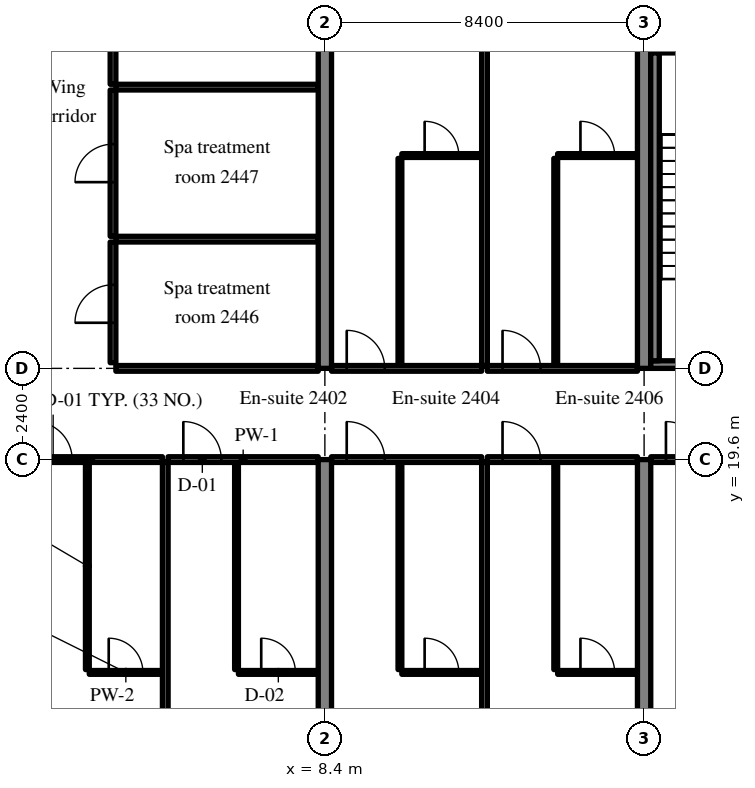
"""IFC4 building model, lengths in metres.
Left out: names, types, materials, properties, quantities, classifications, styles, units other than length and angle.
Written with IfcOpenShell. Run it as: python <this file> out.ifc"""

import sys

from ifc_helpers import new_model, si_unit, direction, frame, frame_2d, origin, place, context, subcontext, project, spatial, rectangle, extrude, source, transform, mapped, element, fill, save


model = new_model("IFC4")
c1 = context("Model", 3, precision=1e-05, world=origin(), true_north=direction((0.0, 1.0)))
c2 = subcontext(c1, "Body", "Model", "MODEL_VIEW")
j1 = project(units=[si_unit("LENGTHUNIT", "METRE"), si_unit("PLANEANGLEUNIT", "RADIAN")], contexts=[c1])
p1 = place(None, origin())
s1 = spatial("IfcSite", under=j1, at=p1, CompositionType="ELEMENT")
p2 = place(p1, origin())
s2 = spatial("IfcBuilding", under=s1, at=p2, CompositionType="ELEMENT")
p3 = place(p2, frame((0.0, 0.0, 102.8)))
s3 = spatial("IfcBuildingStorey", under=s2, at=p3, CompositionType="ELEMENT", Elevation=102.8)
m1 = source(origin(), c2, "Body", "SweptSolid", [
    extrude(rectangle(XDim=14.1, YDim=0.35, at=frame_2d((7.05, 0.0))), origin(), (0.0, 0.0, 1.0), 3.52),
])
p4 = place(p3, frame((8.4, 5.5, 0.0), z_axis=(0.0, 0.0, 1.0), x_axis=(0.0, 1.0, 0.0)))
e1 = element("IfcWall", 1, at=p4, inside=s3, PredefinedType="SHEAR", context=c2, shape_type="MappedRepresentation", body=[
    mapped(m1, transform((0.0, 0.0, 0.0), scale=1.0)),
])
m2 = source(origin(), c2, "Body", "SweptSolid", [
    extrude(rectangle(XDim=20.0, YDim=0.35, at=frame_2d((10.0, 0.0))), origin(), (0.0, 0.0, 1.0), 3.52),
])
p5 = place(p3, frame((8.4, 22.0, 0.0), z_axis=(0.0, 0.0, 1.0), x_axis=(0.0, 1.0, 0.0)))
e2 = element("IfcWall", 2, at=p5, inside=s3, PredefinedType="SHEAR", context=c2, shape_type="MappedRepresentation", body=[
    mapped(m2, transform((0.0, 0.0, 0.0), scale=1.0)),
])
p6 = place(p3, frame((16.8, 5.5, 0.0), z_axis=(0.0, 0.0, 1.0), x_axis=(0.0, 1.0, 0.0)))
e3 = element("IfcWall", 3, at=p6, inside=s3, PredefinedType="SHEAR", context=c2, shape_type="MappedRepresentation", body=[
    mapped(m1, transform((0.0, 0.0, 0.0), scale=1.0)),
])
p7 = place(p3, frame((16.8, 22.0, 0.0), z_axis=(0.0, 0.0, 1.0), x_axis=(0.0, 1.0, 0.0)))
e4 = element("IfcWall", 4, at=p7, inside=s3, PredefinedType="SHEAR", context=c2, shape_type="MappedRepresentation", body=[
    mapped(m2, transform((0.0, 0.0, 0.0), scale=1.0)),
])
m3 = source(origin(), c2, "Body", "SweptSolid", [
    extrude(rectangle(XDim=8.225, YDim=0.2, at=frame_2d((4.112, 0.0))), origin(), (0.0, 0.0, 1.0), 3.52),
])
p8 = place(p3, frame((16.975, 22.1, 0.0), z_axis=(0.0, 0.0, 1.0), x_axis=(1.0, 0.0, 0.0)))
e5 = element("IfcWall", 5, at=p8, inside=s3, PredefinedType="SOLIDWALL", context=c2, shape_type="MappedRepresentation", body=[
    mapped(m3, transform((0.0, 0.0, 0.0), scale=1.0)),
])
m4 = source(origin(), c2, "Body", "SweptSolid", [
    extrude(rectangle(XDim=1.2, YDim=2.1, at=frame_2d((0.6, 1.05))), frame((0.0, 0.11, 0.0), z_axis=(0.0, -1.0, 0.0), x_axis=(1.0, 0.0, 0.0)), (0.0, 0.0, 1.0), 0.22),
])
p9 = place(p8, frame((6.025, 0.0, 0.0)))
e6 = element("IfcOpeningElement", 6, at=p9, cuts=e5, PredefinedType="OPENING", context=c2, shape_type="MappedRepresentation", body=[
    mapped(m4, transform((0.0, 0.0, 0.0), scale=1.0)),
])
p10 = place(p3, frame((16.975, 30.4, 0.0), z_axis=(0.0, 0.0, 1.0), x_axis=(1.0, 0.0, 0.0)))
e7 = element("IfcWall", 7, at=p10, inside=s3, PredefinedType="SOLIDWALL", context=c2, shape_type="MappedRepresentation", body=[
    mapped(m3, transform((0.0, 0.0, 0.0), scale=1.0)),
])
m5 = source(origin(), c2, "Body", "SweptSolid", [
    extrude(rectangle(XDim=1.0, YDim=2.1, at=frame_2d((0.5, 1.05))), frame((0.0, 0.11, 0.0), z_axis=(0.0, -1.0, 0.0), x_axis=(1.0, 0.0, 0.0)), (0.0, 0.0, 1.0), 0.22),
])
p11 = place(p10, frame((6.125, 0.0, 0.0)))
e8 = element("IfcOpeningElement", 8, at=p11, cuts=e7, PredefinedType="OPENING", context=c2, shape_type="MappedRepresentation", body=[
    mapped(m5, transform((0.0, 0.0, 0.0), scale=1.0)),
])
m6 = source(origin(), c2, "Body", "SweptSolid", [
    extrude(rectangle(XDim=8.1, YDim=0.225, at=frame_2d((4.05, 0.0))), origin(), (0.0, 0.0, 1.0), 3.52),
])
p12 = place(p3, frame((17.087, 22.2, 0.0), z_axis=(0.0, 0.0, 1.0), x_axis=(0.0, 1.0, 0.0)))
e9 = element("IfcWall", 9, at=p12, inside=s3, PredefinedType="SOLIDWALL", context=c2, shape_type="MappedRepresentation", body=[
    mapped(m6, transform((0.0, 0.0, 0.0), scale=1.0)),
])
m7 = source(origin(), c2, "Body", "SweptSolid", [
    extrude(rectangle(XDim=5.45, YDim=0.1, at=frame_2d((2.725, 0.0))), origin(), (0.0, 0.0, 1.0), 3.52),
])
p13 = place(p3, frame((2.15, 14.075, 0.0), z_axis=(0.0, 0.0, 1.0), x_axis=(0.0, 1.0, 0.0)))
e10 = element("IfcWall", 10, at=p13, inside=s3, PredefinedType="PARTITIONING", context=c2, shape_type="MappedRepresentation", body=[
    mapped(m7, transform((0.0, 0.0, 0.0), scale=1.0)),
])
m8 = source(origin(), c2, "Body", "SweptSolid", [
    extrude(rectangle(XDim=1.925, YDim=0.1, at=frame_2d((0.962, 0.0))), origin(), (0.0, 0.0, 1.0), 3.52),
])
p14 = place(p3, frame((2.2, 14.0, 0.0), z_axis=(0.0, 0.0, 1.0), x_axis=(1.0, 0.0, 0.0)))
e11 = element("IfcWall", 11, at=p14, inside=s3, PredefinedType="PARTITIONING", context=c2, shape_type="MappedRepresentation", body=[
    mapped(m8, transform((0.0, 0.0, 0.0), scale=1.0)),
])
m9 = source(origin(), c2, "Body", "SweptSolid", [
    extrude(rectangle(XDim=0.9, YDim=2.1, at=frame_2d((0.45, 1.05))), frame((0.0, 0.06, 0.0), z_axis=(0.0, -1.0, 0.0), x_axis=(1.0, 0.0, 0.0)), (0.0, 0.0, 1.0), 0.12),
])
p15 = place(p14, frame((0.512, 0.0, 0.0)))
e12 = element("IfcOpeningElement", 12, at=p15, cuts=e11, PredefinedType="OPENING", context=c2, shape_type="MappedRepresentation", body=[
    mapped(m9, transform((0.0, 0.0, 0.0), scale=1.0)),
])
m10 = source(origin(), c2, "Body", "SweptSolid", [
    extrude(rectangle(XDim=3.775, YDim=0.15, at=frame_2d((1.887, 0.0))), origin(), (0.0, 0.0, 1.0), 2.82),
])
p16 = place(p3, frame((0.35, 19.6, 0.0), z_axis=(0.0, 0.0, 1.0), x_axis=(1.0, 0.0, 0.0)))
e13 = element("IfcWall", 13, at=p16, inside=s3, PredefinedType="PARTITIONING", context=c2, shape_type="MappedRepresentation", body=[
    mapped(m10, transform((0.0, 0.0, 0.0), scale=1.0)),
])
m11 = source(origin(), c2, "Body", "SweptSolid", [
    extrude(rectangle(XDim=1.0, YDim=2.1, at=frame_2d((0.5, 1.05))), frame((0.0, 0.085, 0.0), z_axis=(0.0, -1.0, 0.0), x_axis=(1.0, 0.0, 0.0)), (0.0, 0.0, 1.0), 0.17),
])
p17 = place(p16, frame((0.4, 0.0, 0.0)))
e14 = element("IfcOpeningElement", 14, at=p17, cuts=e13, PredefinedType="OPENING", context=c2, shape_type="MappedRepresentation", body=[
    mapped(m11, transform((0.0, 0.0, 0.0), scale=1.0)),
])
p18 = place(p3, frame((6.075, 14.075, 0.0), z_axis=(0.0, 0.0, 1.0), x_axis=(0.0, 1.0, 0.0)))
e15 = element("IfcWall", 15, at=p18, inside=s3, PredefinedType="PARTITIONING", context=c2, shape_type="MappedRepresentation", body=[
    mapped(m7, transform((0.0, 0.0, 0.0), scale=1.0)),
])
m12 = source(origin(), c2, "Body", "SweptSolid", [
    extrude(rectangle(XDim=2.1, YDim=0.1, at=frame_2d((1.05, 0.0))), origin(), (0.0, 0.0, 1.0), 3.52),
])
p19 = place(p3, frame((6.125, 14.0, 0.0), z_axis=(0.0, 0.0, 1.0), x_axis=(1.0, 0.0, 0.0)))
e16 = element("IfcWall", 16, at=p19, inside=s3, PredefinedType="PARTITIONING", context=c2, shape_type="MappedRepresentation", body=[
    mapped(m12, transform((0.0, 0.0, 0.0), scale=1.0)),
])
p20 = place(p19, frame((0.6, 0.0, 0.0)))
e17 = element("IfcOpeningElement", 17, at=p20, cuts=e16, PredefinedType="OPENING", context=c2, shape_type="MappedRepresentation", body=[
    mapped(m9, transform((0.0, 0.0, 0.0), scale=1.0)),
])
m13 = source(origin(), c2, "Body", "SweptSolid", [
    extrude(rectangle(XDim=3.95, YDim=0.15, at=frame_2d((1.975, 0.0))), origin(), (0.0, 0.0, 1.0), 2.82),
])
p21 = place(p3, frame((4.275, 19.6, 0.0), z_axis=(0.0, 0.0, 1.0), x_axis=(1.0, 0.0, 0.0)))
e18 = element("IfcWall", 18, at=p21, inside=s3, PredefinedType="PARTITIONING", context=c2, shape_type="MappedRepresentation", body=[
    mapped(m13, transform((0.0, 0.0, 0.0), scale=1.0)),
])
p22 = place(p21, frame((0.4, 0.0, 0.0)))
e19 = element("IfcOpeningElement", 19, at=p22, cuts=e18, PredefinedType="OPENING", context=c2, shape_type="MappedRepresentation", body=[
    mapped(m11, transform((0.0, 0.0, 0.0), scale=1.0)),
])
m14 = source(origin(), c2, "Body", "SweptSolid", [
    extrude(rectangle(XDim=13.447, YDim=0.15, at=frame_2d((6.724, 0.0))), origin(), (0.0, 0.0, 1.0), 3.52),
])
p23 = place(p3, frame((4.2, 6.078, 0.0), z_axis=(0.0, 0.0, 1.0), x_axis=(0.0, 1.0, 0.0)))
e20 = element("IfcWall", 20, at=p23, inside=s3, PredefinedType="PARTITIONING", context=c2, shape_type="MappedRepresentation", body=[
    mapped(m14, transform((0.0, 0.0, 0.0), scale=1.0)),
])
p24 = place(p3, frame((10.375, 14.075, 0.0), z_axis=(0.0, 0.0, 1.0), x_axis=(0.0, 1.0, 0.0)))
e21 = element("IfcWall", 21, at=p24, inside=s3, PredefinedType="PARTITIONING", context=c2, shape_type="MappedRepresentation", body=[
    mapped(m7, transform((0.0, 0.0, 0.0), scale=1.0)),
])
m15 = source(origin(), c2, "Body", "SweptSolid", [
    extrude(rectangle(XDim=2.1, YDim=0.1, at=frame_2d((1.05, 0.0))), origin(), (0.0, 0.0, 1.0), 3.52),
])
p25 = place(p3, frame((10.425, 14.0, 0.0), z_axis=(0.0, 0.0, 1.0), x_axis=(1.0, 0.0, 0.0)))
e22 = element("IfcWall", 22, at=p25, inside=s3, PredefinedType="PARTITIONING", context=c2, shape_type="MappedRepresentation", body=[
    mapped(m15, transform((0.0, 0.0, 0.0), scale=1.0)),
])
p26 = place(p25, frame((0.6, 0.0, 0.0)))
e23 = element("IfcOpeningElement", 23, at=p26, cuts=e22, PredefinedType="OPENING", context=c2, shape_type="MappedRepresentation", body=[
    mapped(m9, transform((0.0, 0.0, 0.0), scale=1.0)),
])
m16 = source(origin(), c2, "Body", "SweptSolid", [
    extrude(rectangle(XDim=3.95, YDim=0.15, at=frame_2d((1.975, 0.0))), origin(), (0.0, 0.0, 1.0), 2.82),
])
p27 = place(p3, frame((8.575, 19.6, 0.0), z_axis=(0.0, 0.0, 1.0), x_axis=(1.0, 0.0, 0.0)))
e24 = element("IfcWall", 24, at=p27, inside=s3, PredefinedType="PARTITIONING", context=c2, shape_type="MappedRepresentation", body=[
    mapped(m16, transform((0.0, 0.0, 0.0), scale=1.0)),
])
p28 = place(p27, frame((0.4, 0.0, 0.0)))
e25 = element("IfcOpeningElement", 25, at=p28, cuts=e24, PredefinedType="OPENING", context=c2, shape_type="MappedRepresentation", body=[
    mapped(m11, transform((0.0, 0.0, 0.0), scale=1.0)),
])
p29 = place(p3, frame((14.475, 14.075, 0.0), z_axis=(0.0, 0.0, 1.0), x_axis=(0.0, 1.0, 0.0)))
e26 = element("IfcWall", 26, at=p29, inside=s3, PredefinedType="PARTITIONING", context=c2, shape_type="MappedRepresentation", body=[
    mapped(m7, transform((0.0, 0.0, 0.0), scale=1.0)),
])
p30 = place(p3, frame((14.525, 14.0, 0.0), z_axis=(0.0, 0.0, 1.0), x_axis=(1.0, 0.0, 0.0)))
e27 = element("IfcWall", 27, at=p30, inside=s3, PredefinedType="PARTITIONING", context=c2, shape_type="MappedRepresentation", body=[
    mapped(m12, transform((0.0, 0.0, 0.0), scale=1.0)),
])
p31 = place(p30, frame((0.6, 0.0, 0.0)))
e28 = element("IfcOpeningElement", 28, at=p31, cuts=e27, PredefinedType="OPENING", context=c2, shape_type="MappedRepresentation", body=[
    mapped(m9, transform((0.0, 0.0, 0.0), scale=1.0)),
])
p32 = place(p3, frame((12.675, 19.6, 0.0), z_axis=(0.0, 0.0, 1.0), x_axis=(1.0, 0.0, 0.0)))
e29 = element("IfcWall", 29, at=p32, inside=s3, PredefinedType="PARTITIONING", context=c2, shape_type="MappedRepresentation", body=[
    mapped(m16, transform((0.0, 0.0, 0.0), scale=1.0)),
])
p33 = place(p32, frame((0.4, 0.0, 0.0)))
e30 = element("IfcOpeningElement", 30, at=p33, cuts=e29, PredefinedType="OPENING", context=c2, shape_type="MappedRepresentation", body=[
    mapped(m11, transform((0.0, 0.0, 0.0), scale=1.0)),
])
m17 = source(origin(), c2, "Body", "SweptSolid", [
    extrude(rectangle(XDim=13.575, YDim=0.15, at=frame_2d((6.788, 0.0))), origin(), (0.0, 0.0, 1.0), 3.52),
])
p34 = place(p3, frame((12.6, 5.95, 0.0), z_axis=(0.0, 0.0, 1.0), x_axis=(0.0, 1.0, 0.0)))
e31 = element("IfcWall", 31, at=p34, inside=s3, PredefinedType="PARTITIONING", context=c2, shape_type="MappedRepresentation", body=[
    mapped(m17, transform((0.0, 0.0, 0.0), scale=1.0)),
])
p35 = place(p3, frame((16.975, 19.6, 0.0), z_axis=(0.0, 0.0, 1.0), x_axis=(1.0, 0.0, 0.0)))
e32 = element("IfcWall", 32, at=p35, inside=s3, PredefinedType="PARTITIONING", context=c2, shape_type="MappedRepresentation", body=[
    mapped(m16, transform((0.0, 0.0, 0.0), scale=1.0)),
])
p36 = place(p35, frame((0.4, 0.0, 0.0)))
e33 = element("IfcOpeningElement", 33, at=p36, cuts=e32, PredefinedType="OPENING", context=c2, shape_type="MappedRepresentation", body=[
    mapped(m11, transform((0.0, 0.0, 0.0), scale=1.0)),
])
m18 = source(origin(), c2, "Body", "SweptSolid", [
    extrude(rectangle(XDim=5.325, YDim=0.15, at=frame_2d((2.663, 0.0))), origin(), (0.0, 0.0, 1.0), 2.82),
])
p37 = place(p3, frame((2.9, 22.0, 0.0), z_axis=(0.0, 0.0, 1.0), x_axis=(1.0, 0.0, 0.0)))
e34 = element("IfcWall", 34, at=p37, inside=s3, PredefinedType="PARTITIONING", context=c2, shape_type="MappedRepresentation", body=[
    mapped(m18, transform((0.0, 0.0, 0.0), scale=1.0)),
])
m19 = source(origin(), c2, "Body", "SweptSolid", [
    extrude(rectangle(XDim=3.175, YDim=0.15, at=frame_2d((1.587, 0.0))), origin(), (0.0, 0.0, 1.0), 3.52),
])
p38 = place(p3, frame((2.825, 22.15, 0.0), z_axis=(0.0, 0.0, 1.0), x_axis=(0.0, 1.0, 0.0)))
e35 = element("IfcWall", 35, at=p38, inside=s3, PredefinedType="PARTITIONING", context=c2, shape_type="MappedRepresentation", body=[
    mapped(m19, transform((0.0, 0.0, 0.0), scale=1.0)),
])
p39 = place(p38, frame((1.05, 0.0, 0.0)))
e36 = element("IfcOpeningElement", 36, at=p39, cuts=e35, PredefinedType="OPENING", context=c2, shape_type="MappedRepresentation", body=[
    mapped(m11, transform((0.0, 0.0, 0.0), scale=1.0)),
])
m20 = source(origin(), c2, "Body", "SweptSolid", [
    extrude(rectangle(XDim=5.325, YDim=0.15, at=frame_2d((2.663, 0.0))), origin(), (0.0, 0.0, 1.0), 3.52),
])
p40 = place(p3, frame((2.9, 25.4, 0.0), z_axis=(0.0, 0.0, 1.0), x_axis=(1.0, 0.0, 0.0)))
e37 = element("IfcWall", 37, at=p40, inside=s3, PredefinedType="PARTITIONING", context=c2, shape_type="MappedRepresentation", body=[
    mapped(m20, transform((0.0, 0.0, 0.0), scale=1.0)),
])
m21 = source(origin(), c2, "Body", "SweptSolid", [
    extrude(rectangle(XDim=3.85, YDim=0.15, at=frame_2d((1.925, 0.0))), origin(), (0.0, 0.0, 1.0), 3.52),
])
p41 = place(p3, frame((2.825, 25.475, 0.0), z_axis=(0.0, 0.0, 1.0), x_axis=(0.0, 1.0, 0.0)))
e38 = element("IfcWall", 38, at=p41, inside=s3, PredefinedType="PARTITIONING", context=c2, shape_type="MappedRepresentation", body=[
    mapped(m21, transform((0.0, 0.0, 0.0), scale=1.0)),
])
p42 = place(p41, frame((1.425, 0.0, 0.0)))
e39 = element("IfcOpeningElement", 39, at=p42, cuts=e38, PredefinedType="OPENING", context=c2, shape_type="MappedRepresentation", body=[
    mapped(m11, transform((0.0, 0.0, 0.0), scale=1.0)),
])
p43 = place(p3, frame((2.9, 29.4, 0.0), z_axis=(0.0, 0.0, 1.0), x_axis=(1.0, 0.0, 0.0)))
e40 = element("IfcWall", 40, at=p43, inside=s3, PredefinedType="PARTITIONING", context=c2, shape_type="MappedRepresentation", body=[
    mapped(m20, transform((0.0, 0.0, 0.0), scale=1.0)),
])
m22 = source(origin(), c2, "Body", "SweptSolid", [
    extrude(rectangle(XDim=4.45, YDim=0.15, at=frame_2d((2.225, 0.0))), origin(), (0.0, 0.0, 1.0), 3.52),
])
p44 = place(p3, frame((2.825, 29.475, 0.0), z_axis=(0.0, 0.0, 1.0), x_axis=(0.0, 1.0, 0.0)))
e41 = element("IfcWall", 41, at=p44, inside=s3, PredefinedType="PARTITIONING", context=c2, shape_type="MappedRepresentation", body=[
    mapped(m22, transform((0.0, 0.0, 0.0), scale=1.0)),
])
p45 = place(p44, frame((1.725, 0.0, 0.0)))
e42 = element("IfcOpeningElement", 42, at=p45, cuts=e41, PredefinedType="OPENING", context=c2, shape_type="MappedRepresentation", body=[
    mapped(m11, transform((0.0, 0.0, 0.0), scale=1.0)),
])
p46 = place(p3, frame((10.375, 22.075, 0.0), z_axis=(0.0, 0.0, 1.0), x_axis=(0.0, 1.0, 0.0)))
e43 = element("IfcWall", 43, at=p46, inside=s3, PredefinedType="PARTITIONING", context=c2, shape_type="MappedRepresentation", body=[
    mapped(m7, transform((0.0, 0.0, 0.0), scale=1.0)),
])
p47 = place(p3, frame((10.425, 27.6, 0.0), z_axis=(0.0, 0.0, 1.0), x_axis=(1.0, 0.0, 0.0)))
e44 = element("IfcWall", 44, at=p47, inside=s3, PredefinedType="PARTITIONING", context=c2, shape_type="MappedRepresentation", body=[
    mapped(m15, transform((0.0, 0.0, 0.0), scale=1.0)),
])
p48 = place(p47, frame((0.6, 0.0, 0.0)))
e45 = element("IfcOpeningElement", 45, at=p48, cuts=e44, PredefinedType="OPENING", context=c2, shape_type="MappedRepresentation", body=[
    mapped(m9, transform((0.0, 0.0, 0.0), scale=1.0)),
])
p49 = place(p3, frame((8.575, 22.0, 0.0), z_axis=(0.0, 0.0, 1.0), x_axis=(1.0, 0.0, 0.0)))
e46 = element("IfcWall", 46, at=p49, inside=s3, PredefinedType="PARTITIONING", context=c2, shape_type="MappedRepresentation", body=[
    mapped(m16, transform((0.0, 0.0, 0.0), scale=1.0)),
])
p50 = place(p49, frame((0.4, 0.0, 0.0)))
e47 = element("IfcOpeningElement", 47, at=p50, cuts=e46, PredefinedType="OPENING", context=c2, shape_type="MappedRepresentation", body=[
    mapped(m11, transform((0.0, 0.0, 0.0), scale=1.0)),
])
p51 = place(p3, frame((14.475, 22.075, 0.0), z_axis=(0.0, 0.0, 1.0), x_axis=(0.0, 1.0, 0.0)))
e48 = element("IfcWall", 48, at=p51, inside=s3, PredefinedType="PARTITIONING", context=c2, shape_type="MappedRepresentation", body=[
    mapped(m7, transform((0.0, 0.0, 0.0), scale=1.0)),
])
p52 = place(p3, frame((14.525, 27.6, 0.0), z_axis=(0.0, 0.0, 1.0), x_axis=(1.0, 0.0, 0.0)))
e49 = element("IfcWall", 49, at=p52, inside=s3, PredefinedType="PARTITIONING", context=c2, shape_type="MappedRepresentation", body=[
    mapped(m12, transform((0.0, 0.0, 0.0), scale=1.0)),
])
p53 = place(p52, frame((0.6, 0.0, 0.0)))
e50 = element("IfcOpeningElement", 50, at=p53, cuts=e49, PredefinedType="OPENING", context=c2, shape_type="MappedRepresentation", body=[
    mapped(m9, transform((0.0, 0.0, 0.0), scale=1.0)),
])
p54 = place(p3, frame((12.675, 22.0, 0.0), z_axis=(0.0, 0.0, 1.0), x_axis=(1.0, 0.0, 0.0)))
e51 = element("IfcWall", 51, at=p54, inside=s3, PredefinedType="PARTITIONING", context=c2, shape_type="MappedRepresentation", body=[
    mapped(m16, transform((0.0, 0.0, 0.0), scale=1.0)),
])
p55 = place(p54, frame((0.4, 0.0, 0.0)))
e52 = element("IfcOpeningElement", 52, at=p55, cuts=e51, PredefinedType="OPENING", context=c2, shape_type="MappedRepresentation", body=[
    mapped(m11, transform((0.0, 0.0, 0.0), scale=1.0)),
])
m23 = source(origin(), c2, "Body", "SweptSolid", [
    extrude(rectangle(XDim=19.225, YDim=0.15, at=frame_2d((9.613, 0.0))), origin(), (0.0, 0.0, 1.0), 3.52),
])
p56 = place(p3, frame((12.6, 22.075, 0.0), z_axis=(0.0, 0.0, 1.0), x_axis=(0.0, 1.0, 0.0)))
e53 = element("IfcWall", 53, at=p56, inside=s3, PredefinedType="PARTITIONING", context=c2, shape_type="MappedRepresentation", body=[
    mapped(m23, transform((0.0, 0.0, 0.0), scale=1.0)),
])
m24 = source(origin(), c2, "Body", "SweptSolid", [
    extrude(rectangle(XDim=0.9, YDim=2.1, at=frame_2d((0.45, 1.05))), frame((0.0, 0.025, 0.0), z_axis=(0.0, -1.0, 0.0), x_axis=(1.0, 0.0, 0.0)), (0.0, 0.0, 1.0), 0.05),
])
p57 = place(p15, origin())
e54 = element("IfcDoor", 54, at=p57, inside=s3, OperationType="SINGLE_SWING_LEFT", PredefinedType="DOOR", context=c2, shape_type="MappedRepresentation", body=[
    mapped(m24, transform((0.0, 0.0, 0.0), scale=1.0)),
])
fill(e12, e54)
m25 = source(origin(), c2, "Body", "SweptSolid", [
    extrude(rectangle(XDim=1.0, YDim=2.1, at=frame_2d((0.5, 1.05))), frame((0.0, 0.025, 0.0), z_axis=(0.0, -1.0, 0.0), x_axis=(1.0, 0.0, 0.0)), (0.0, 0.0, 1.0), 0.05),
])
p58 = place(p17, origin())
e55 = element("IfcDoor", 55, at=p58, inside=s3, OperationType="SINGLE_SWING_LEFT", PredefinedType="DOOR", context=c2, shape_type="MappedRepresentation", body=[
    mapped(m25, transform((0.0, 0.0, 0.0), scale=1.0)),
])
fill(e14, e55)
p59 = place(p20, origin())
e56 = element("IfcDoor", 56, at=p59, inside=s3, OperationType="SINGLE_SWING_LEFT", PredefinedType="DOOR", context=c2, shape_type="MappedRepresentation", body=[
    mapped(m24, transform((0.0, 0.0, 0.0), scale=1.0)),
])
fill(e17, e56)
p60 = place(p22, origin())
e57 = element("IfcDoor", 57, at=p60, inside=s3, OperationType="SINGLE_SWING_LEFT", PredefinedType="DOOR", context=c2, shape_type="MappedRepresentation", body=[
    mapped(m25, transform((0.0, 0.0, 0.0), scale=1.0)),
])
fill(e19, e57)
p61 = place(p26, origin())
e58 = element("IfcDoor", 58, at=p61, inside=s3, OperationType="SINGLE_SWING_LEFT", PredefinedType="DOOR", context=c2, shape_type="MappedRepresentation", body=[
    mapped(m24, transform((0.0, 0.0, 0.0), scale=1.0)),
])
fill(e23, e58)
p62 = place(p28, origin())
e59 = element("IfcDoor", 59, at=p62, inside=s3, OperationType="SINGLE_SWING_LEFT", PredefinedType="DOOR", context=c2, shape_type="MappedRepresentation", body=[
    mapped(m25, transform((0.0, 0.0, 0.0), scale=1.0)),
])
fill(e25, e59)
p63 = place(p31, origin())
e60 = element("IfcDoor", 60, at=p63, inside=s3, OperationType="SINGLE_SWING_LEFT", PredefinedType="DOOR", context=c2, shape_type="MappedRepresentation", body=[
    mapped(m24, transform((0.0, 0.0, 0.0), scale=1.0)),
])
fill(e28, e60)
p64 = place(p33, origin())
e61 = element("IfcDoor", 61, at=p64, inside=s3, OperationType="SINGLE_SWING_LEFT", PredefinedType="DOOR", context=c2, shape_type="MappedRepresentation", body=[
    mapped(m25, transform((0.0, 0.0, 0.0), scale=1.0)),
])
fill(e30, e61)
p65 = place(p36, origin())
e62 = element("IfcDoor", 62, at=p65, inside=s3, OperationType="SINGLE_SWING_LEFT", PredefinedType="DOOR", context=c2, shape_type="MappedRepresentation", body=[
    mapped(m25, transform((0.0, 0.0, 0.0), scale=1.0)),
])
fill(e33, e62)
p66 = place(p39, origin())
e63 = element("IfcDoor", 63, at=p66, inside=s3, OperationType="SINGLE_SWING_LEFT", PredefinedType="DOOR", context=c2, shape_type="MappedRepresentation", body=[
    mapped(m25, transform((0.0, 0.0, 0.0), scale=1.0)),
])
fill(e36, e63)
p67 = place(p42, origin())
e64 = element("IfcDoor", 64, at=p67, inside=s3, OperationType="SINGLE_SWING_LEFT", PredefinedType="DOOR", context=c2, shape_type="MappedRepresentation", body=[
    mapped(m25, transform((0.0, 0.0, 0.0), scale=1.0)),
])
fill(e39, e64)
p68 = place(p48, origin())
e65 = element("IfcDoor", 65, at=p68, inside=s3, OperationType="SINGLE_SWING_LEFT", PredefinedType="DOOR", context=c2, shape_type="MappedRepresentation", body=[
    mapped(m24, transform((0.0, 0.0, 0.0), scale=1.0)),
])
fill(e45, e65)
p69 = place(p50, origin())
e66 = element("IfcDoor", 66, at=p69, inside=s3, OperationType="SINGLE_SWING_LEFT", PredefinedType="DOOR", context=c2, shape_type="MappedRepresentation", body=[
    mapped(m25, transform((0.0, 0.0, 0.0), scale=1.0)),
])
fill(e47, e66)
p70 = place(p53, origin())
e67 = element("IfcDoor", 67, at=p70, inside=s3, OperationType="SINGLE_SWING_LEFT", PredefinedType="DOOR", context=c2, shape_type="MappedRepresentation", body=[
    mapped(m24, transform((0.0, 0.0, 0.0), scale=1.0)),
])
fill(e50, e67)
p71 = place(p55, origin())
e68 = element("IfcDoor", 68, at=p71, inside=s3, OperationType="SINGLE_SWING_LEFT", PredefinedType="DOOR", context=c2, shape_type="MappedRepresentation", body=[
    mapped(m25, transform((0.0, 0.0, 0.0), scale=1.0)),
])
fill(e52, e68)
save(model, sys.argv[1])
